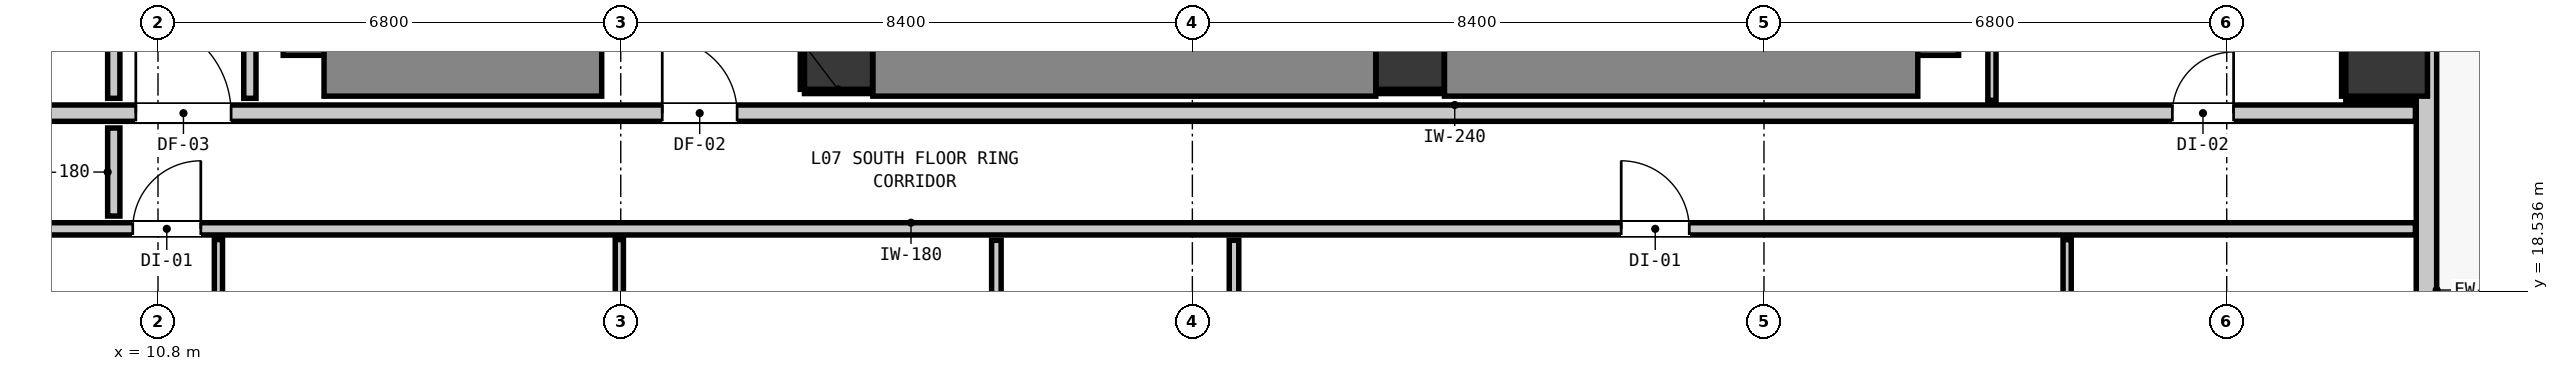
"""IFC4 building model, lengths in metres.
Left out: names, types, materials, properties, quantities, classifications, styles, units other than length and angle.
Written with IfcOpenShell. Run it as: python <this file> out.ifc"""

import sys

from ifc_helpers import new_model, si_unit, direction, frame, frame_2d, origin, origin_2d, place, context, subcontext, project, spatial, rectangle, extrude, element, fill, save


model = new_model("IFC4")
c1 = context("Model", 3, precision=1e-05, world=origin(), true_north=direction((0.0, 1.0)))
c2 = subcontext(c1, "Body", "Model", "MODEL_VIEW")
j1 = project(units=[si_unit("LENGTHUNIT", "METRE"), si_unit("PLANEANGLEUNIT", "RADIAN")], contexts=[c1])
p1 = place(None, origin())
s1 = spatial("IfcSite", under=j1, at=p1, CompositionType="ELEMENT")
p2 = place(p1, origin())
s2 = spatial("IfcBuilding", under=s1, at=p2, CompositionType="ELEMENT")
p3 = place(p2, frame((0.0, 0.0, 28.64)))
s3 = spatial("IfcBuildingStorey", under=s2, at=p3, CompositionType="ELEMENT", Elevation=28.64)
for number, where, z_axis, x_axis in (
    (1, (20.8, 22.0, 0.0), (0.0, 0.0, 1.0), (1.0, 0.0, 0.0)),
    (2, (29.2, 22.0, 0.0), (0.0, 0.0, 1.0), (1.0, 0.0, 0.0)),
):
    element("IfcColumn", number, at=place(p3, frame(where, z_axis=z_axis, x_axis=x_axis)), inside=s3, PredefinedType="COLUMN", context=c2, shape_type="SweptSolid", body=[
        extrude(rectangle(XDim=1.0, YDim=1.0, at=origin_2d()), origin(), (0.0, 0.0, 1.0), 3.32),
    ])
p4 = place(p3, frame((13.24, 22.0, 0.0), z_axis=(0.0, 0.0, 1.0), x_axis=(0.0, 1.0, 0.0)))
e3 = element("IfcWall", 3, at=p4, inside=s3, PredefinedType="SHEAR", context=c2, shape_type="SweptSolid", body=[
    extrude(rectangle(XDim=8.195, YDim=1.2, at=frame_2d((4.098, 0.0))), origin(), (0.0, 0.0, 1.0), 3.32),
])
p5 = place(p3, frame((13.24, 22.0, 0.0), z_axis=(0.0, 0.0, 1.0), x_axis=(1.0, 0.0, 0.0)))
e4 = element("IfcWall", 4, at=p5, inside=s3, PredefinedType="SHEAR", context=c2, shape_type="SweptSolid", body=[
    extrude(rectangle(XDim=4.08, YDim=1.2, at=frame_2d((2.04, 0.0))), origin(), (0.0, 0.0, 1.0), 3.32),
])
p6 = place(p3, frame((36.66, 22.0, 0.0), z_axis=(0.0, 0.0, 1.0), x_axis=(0.0, 1.0, 0.0)))
e5 = element("IfcWall", 5, at=p6, inside=s3, PredefinedType="SHEAR", context=c2, shape_type="SweptSolid", body=[
    extrude(rectangle(XDim=8.195, YDim=1.2, at=frame_2d((4.098, 0.0))), origin(), (0.0, 0.0, 1.0), 3.32),
])
p7 = place(p3, frame((29.705, 22.0, 0.0), z_axis=(0.0, 0.0, 1.0), x_axis=(1.0, 0.0, 0.0)))
e6 = element("IfcWall", 6, at=p7, inside=s3, PredefinedType="SHEAR", context=c2, shape_type="SweptSolid", body=[
    extrude(rectangle(XDim=6.955, YDim=1.2, at=frame_2d((3.478, 0.0))), origin(), (0.0, 0.0, 1.0), 3.32),
])
p8 = place(p3, frame((21.305, 22.0, 0.0), z_axis=(0.0, 0.0, 1.0), x_axis=(1.0, 0.0, 0.0)))
e7 = element("IfcWall", 7, at=p8, inside=s3, PredefinedType="SHEAR", context=c2, shape_type="SweptSolid", body=[
    extrude(rectangle(XDim=7.39, YDim=1.2, at=frame_2d((3.695, 0.0))), origin(), (0.0, 0.0, 1.0), 3.32),
])
p9 = place(p3, frame((43.55, 22.0, 0.0), z_axis=(0.0, 0.0, 1.0), x_axis=(1.0, 0.0, 0.0)))
e8 = element("IfcColumn", 8, at=p9, inside=s3, PredefinedType="COLUMN", context=c2, shape_type="SweptSolid", body=[
    extrude(rectangle(XDim=1.2, YDim=1.2, at=origin_2d()), origin(), (0.0, 0.0, 1.0), 3.32),
])
p10 = place(p3, frame((44.135, 44.835, 0.0), z_axis=(0.0, 0.0, 1.0), x_axis=(0.0, -1.0, 0.0)))
e9 = element("IfcWall", 9, at=p10, inside=s3, PredefinedType="STANDARD", context=c2, shape_type="SweptSolid", body=[
    extrude(rectangle(XDim=34.67, YDim=0.3, at=frame_2d((17.335, 0.0))), origin(), (0.0, 0.0, 1.0), 3.06),
])
p11 = place(p10, frame((1.251, 0.0, 0.0)))
e10 = element("IfcOpeningElement", 10, at=p11, cuts=e9, PredefinedType="OPENING", context=c2, shape_type="SweptSolid", body=[
    extrude(rectangle(XDim=1.0, YDim=2.15, at=frame_2d((0.5, 1.075))), frame((0.0, 0.16, 0.0), z_axis=(0.0, -1.0, 0.0), x_axis=(1.0, 0.0, 0.0)), (0.0, 0.0, 1.0), 0.32),
])
p12 = place(p10, frame((32.733, 0.0, 0.85)))
e11 = element("IfcOpeningElement", 11, at=p12, cuts=e9, PredefinedType="OPENING", context=c2, shape_type="SweptSolid", body=[
    extrude(rectangle(XDim=1.05, YDim=1.65, at=frame_2d((0.525, 0.825))), frame((0.0, 0.16, 0.0), z_axis=(0.0, -1.0, 0.0), x_axis=(1.0, 0.0, 0.0)), (0.0, 0.0, 1.0), 0.32),
])
p13 = place(p10, frame((17.135, 0.0, 0.85)))
e12 = element("IfcOpeningElement", 12, at=p13, cuts=e9, PredefinedType="OPENING", context=c2, shape_type="SweptSolid", body=[
    extrude(rectangle(XDim=2.7, YDim=2.0, at=frame_2d((1.35, 1.0))), frame((0.0, 0.16, 0.0), z_axis=(0.0, -1.0, 0.0), x_axis=(1.0, 0.0, 0.0)), (0.0, 0.0, 1.0), 0.32),
])
p14 = place(p10, frame((6.984, 0.0, 0.85)))
e13 = element("IfcOpeningElement", 13, at=p14, cuts=e9, PredefinedType="OPENING", context=c2, shape_type="SweptSolid", body=[
    extrude(rectangle(XDim=1.05, YDim=1.65, at=frame_2d((0.525, 0.825))), frame((0.0, 0.16, 0.0), z_axis=(0.0, -1.0, 0.0), x_axis=(1.0, 0.0, 0.0)), (0.0, 0.0, 1.0), 0.32),
])
p15 = place(p3, frame((1.827, 21.15, 0.0), z_axis=(0.0, 0.0, 1.0), x_axis=(1.0, 0.0, 0.0)))
e14 = element("IfcWall", 14, at=p15, inside=s3, PredefinedType="PARTITIONING", context=c2, shape_type="SweptSolid", body=[
    extrude(rectangle(XDim=42.146, YDim=0.24, at=frame_2d((21.073, 0.0))), origin(), (0.0, 0.0, 1.0), 3.06),
])
p16 = place(p15, frame((16.383, 0.0, 0.0)))
e15 = element("IfcOpeningElement", 15, at=p16, cuts=e14, PredefinedType="OPENING", context=c2, shape_type="SweptSolid", body=[
    extrude(rectangle(XDim=1.1, YDim=2.15, at=frame_2d((0.55, 1.075))), frame((0.0, 0.13, 0.0), z_axis=(0.0, -1.0, 0.0), x_axis=(1.0, 0.0, 0.0)), (0.0, 0.0, 1.0), 0.26),
])
p17 = place(p15, frame((8.647, 0.0, 0.0)))
e16 = element("IfcOpeningElement", 16, at=p17, cuts=e14, PredefinedType="OPENING", context=c2, shape_type="SweptSolid", body=[
    extrude(rectangle(XDim=1.4, YDim=2.15, at=frame_2d((0.7, 1.075))), frame((0.0, 0.13, 0.0), z_axis=(0.0, -1.0, 0.0), x_axis=(1.0, 0.0, 0.0)), (0.0, 0.0, 1.0), 0.26),
])
p18 = place(p15, frame((38.574, 0.0, 0.0)))
e17 = element("IfcOpeningElement", 17, at=p18, cuts=e14, PredefinedType="OPENING", context=c2, shape_type="SweptSolid", body=[
    extrude(rectangle(XDim=0.9, YDim=2.1, at=frame_2d((0.45, 1.05))), frame((0.0, 0.13, 0.0), z_axis=(0.0, -1.0, 0.0), x_axis=(1.0, 0.0, 0.0)), (0.0, 0.0, 1.0), 0.26),
])
p19 = place(p3, frame((1.827, 19.45, 0.0), z_axis=(0.0, 0.0, 1.0), x_axis=(1.0, 0.0, 0.0)))
e18 = element("IfcWall", 18, at=p19, inside=s3, PredefinedType="PARTITIONING", context=c2, shape_type="SweptSolid", body=[
    extrude(rectangle(XDim=42.146, YDim=0.18, at=frame_2d((21.073, 0.0))), origin(), (0.0, 0.0, 1.0), 3.06),
])
p20 = place(p19, frame((8.602, 0.0, 0.0)))
e19 = element("IfcOpeningElement", 19, at=p20, cuts=e18, PredefinedType="OPENING", context=c2, shape_type="SweptSolid", body=[
    extrude(rectangle(XDim=1.0, YDim=2.15, at=frame_2d((0.5, 1.075))), frame((0.0, 0.1, 0.0), z_axis=(0.0, -1.0, 0.0), x_axis=(1.0, 0.0, 0.0)), (0.0, 0.0, 1.0), 0.2),
])
p21 = place(p19, frame((30.475, 0.0, 0.0)))
e20 = element("IfcOpeningElement", 20, at=p21, cuts=e18, PredefinedType="OPENING", context=c2, shape_type="SweptSolid", body=[
    extrude(rectangle(XDim=1.0, YDim=2.15, at=frame_2d((0.5, 1.075))), frame((0.0, 0.1, 0.0), z_axis=(0.0, -1.0, 0.0), x_axis=(1.0, 0.0, 0.0)), (0.0, 0.0, 1.0), 0.2),
])
p22 = place(p3, frame((10.15, 19.638, 0.0), z_axis=(0.0, 0.0, 1.0), x_axis=(0.0, 1.0, 0.0)))
e21 = element("IfcWall", 21, at=p22, inside=s3, PredefinedType="PARTITIONING", context=c2, shape_type="SweptSolid", body=[
    extrude(rectangle(XDim=1.294, YDim=0.18, at=frame_2d((0.647, 0.0))), origin(), (0.0, 0.0, 1.0), 3.06),
])
p23 = place(p3, frame((10.15, 21.368, 0.0), z_axis=(0.0, 0.0, 1.0), x_axis=(0.0, 1.0, 0.0)))
e22 = element("IfcWall", 22, at=p23, inside=s3, PredefinedType="PARTITIONING", context=c2, shape_type="SweptSolid", body=[
    extrude(rectangle(XDim=5.354, YDim=0.18, at=frame_2d((2.677, 0.0))), origin(), (0.0, 0.0, 1.0), 3.06),
])
p24 = place(p3, frame((12.15, 21.368, 0.0), z_axis=(0.0, 0.0, 1.0), x_axis=(0.0, 1.0, 0.0)))
e23 = element("IfcWall", 23, at=p24, inside=s3, PredefinedType="PARTITIONING", context=c2, shape_type="SweptSolid", body=[
    extrude(rectangle(XDim=18.694, YDim=0.18, at=frame_2d((9.347, 0.0))), origin(), (0.0, 0.0, 1.0), 3.06),
])
p25 = place(p3, frame((23.12, 13.148, 0.0), z_axis=(0.0, 0.0, 1.0), x_axis=(0.0, 1.0, 0.0)))
e24 = element("IfcWall", 24, at=p25, inside=s3, PredefinedType="PARTITIONING", context=c2, shape_type="SweptSolid", body=[
    extrude(rectangle(XDim=6.134, YDim=0.14, at=frame_2d((3.067, 0.0))), origin(), (0.0, 0.0, 1.0), 3.06),
])
p26 = place(p3, frame((26.612, 13.148, 0.0), z_axis=(0.0, 0.0, 1.0), x_axis=(0.0, 1.0, 0.0)))
e25 = element("IfcWall", 25, at=p26, inside=s3, PredefinedType="PARTITIONING", context=c2, shape_type="SweptSolid", body=[
    extrude(rectangle(XDim=6.134, YDim=0.14, at=frame_2d((3.067, 0.0))), origin(), (0.0, 0.0, 1.0), 3.06),
])
p27 = place(p26, frame((2.647, 0.0, 0.0)))
e26 = element("IfcOpeningElement", 26, at=p27, cuts=e25, PredefinedType="OPENING", context=c2, shape_type="SweptSolid", body=[
    extrude(rectangle(XDim=0.86, YDim=2.02, at=frame_2d((0.43, 1.01))), frame((0.0, 0.08, 0.0), z_axis=(0.0, -1.0, 0.0), x_axis=(1.0, 0.0, 0.0)), (0.0, 0.0, 1.0), 0.16),
])
p28 = place(p3, frame((11.688, 13.138, 0.0), z_axis=(0.0, 0.0, 1.0), x_axis=(0.0, 1.0, 0.0)))
e27 = element("IfcWall", 27, at=p28, inside=s3, PredefinedType="PARTITIONING", context=c2, shape_type="SweptSolid", body=[
    extrude(rectangle(XDim=6.154, YDim=0.12, at=frame_2d((3.077, 0.0))), origin(), (0.0, 0.0, 1.0), 3.06),
])
p29 = place(p28, frame((2.624, 0.0, 0.0)))
e28 = element("IfcOpeningElement", 28, at=p29, cuts=e27, PredefinedType="OPENING", context=c2, shape_type="SweptSolid", body=[
    extrude(rectangle(XDim=0.9, YDim=2.1, at=frame_2d((0.45, 1.05))), frame((0.0, 0.07, 0.0), z_axis=(0.0, -1.0, 0.0), x_axis=(1.0, 0.0, 0.0)), (0.0, 0.0, 1.0), 0.14),
])
p30 = place(p3, frame((17.579, 13.138, 0.0), z_axis=(0.0, 0.0, 1.0), x_axis=(0.0, 1.0, 0.0)))
e29 = element("IfcWall", 29, at=p30, inside=s3, PredefinedType="PARTITIONING", context=c2, shape_type="SweptSolid", body=[
    extrude(rectangle(XDim=6.154, YDim=0.12, at=frame_2d((3.077, 0.0))), origin(), (0.0, 0.0, 1.0), 3.06),
])
p31 = place(p30, frame((2.637, 0.0, 0.0)))
e30 = element("IfcOpeningElement", 30, at=p31, cuts=e29, PredefinedType="OPENING", context=c2, shape_type="SweptSolid", body=[
    extrude(rectangle(XDim=0.9, YDim=2.1, at=frame_2d((0.45, 1.05))), frame((0.0, 0.07, 0.0), z_axis=(0.0, -1.0, 0.0), x_axis=(1.0, 0.0, 0.0)), (0.0, 0.0, 1.0), 0.14),
])
p32 = place(p3, frame((37.75, 21.338, 0.0), z_axis=(0.0, 0.0, 1.0), x_axis=(0.0, 1.0, 0.0)))
e31 = element("IfcWall", 31, at=p32, inside=s3, PredefinedType="PARTITIONING", context=c2, shape_type="SweptSolid", body=[
    extrude(rectangle(XDim=10.124, YDim=0.12, at=frame_2d((5.062, 0.0))), origin(), (0.0, 0.0, 1.0), 3.06),
])
p33 = place(p3, frame((38.855, 13.138, 0.0), z_axis=(0.0, 0.0, 1.0), x_axis=(0.0, 1.0, 0.0)))
e32 = element("IfcWall", 32, at=p33, inside=s3, PredefinedType="PARTITIONING", context=c2, shape_type="SweptSolid", body=[
    extrude(rectangle(XDim=6.154, YDim=0.12, at=frame_2d((3.077, 0.0))), origin(), (0.0, 0.0, 1.0), 2.445),
])
p34 = place(p33, frame((2.637, 0.0, 0.0)))
e33 = element("IfcOpeningElement", 33, at=p34, cuts=e32, PredefinedType="OPENING", context=c2, shape_type="SweptSolid", body=[
    extrude(rectangle(XDim=0.9, YDim=2.1, at=frame_2d((0.45, 1.05))), frame((0.0, 0.07, 0.0), z_axis=(0.0, -1.0, 0.0), x_axis=(1.0, 0.0, 0.0)), (0.0, 0.0, 1.0), 0.14),
])
p35 = place(p3, frame((20.3, 21.468, 0.0), z_axis=(0.0, 0.0, 1.0), x_axis=(1.0, 0.0, 0.0)))
e34 = element("IfcWall", 34, at=p35, inside=s3, PredefinedType="PARTITIONING", context=c2, shape_type="SweptSolid", body=[
    extrude(rectangle(XDim=0.99, YDim=0.06, at=frame_2d((0.495, 0.0))), origin(), (0.0, 0.0, 1.0), 1.45),
])
p36 = place(p3, frame((20.268, 21.5, 0.0), z_axis=(0.0, 0.0, 1.0), x_axis=(0.0, 1.0, 0.0)))
e35 = element("IfcWall", 35, at=p36, inside=s3, PredefinedType="PARTITIONING", context=c2, shape_type="SweptSolid", body=[
    extrude(rectangle(XDim=1.0, YDim=0.06, at=frame_2d((0.5, 0.0))), origin(), (0.0, 0.0, 1.0), 1.45),
])
p37 = place(p3, frame((28.71, 21.468, 0.0), z_axis=(0.0, 0.0, 1.0), x_axis=(1.0, 0.0, 0.0)))
e36 = element("IfcWall", 36, at=p37, inside=s3, PredefinedType="PARTITIONING", context=c2, shape_type="SweptSolid", body=[
    extrude(rectangle(XDim=0.98, YDim=0.06, at=frame_2d((0.49, 0.0))), origin(), (0.0, 0.0, 1.0), 1.45),
])
p38 = place(p3, frame((42.95, 21.368, 0.0), z_axis=(0.0, 0.0, 1.0), x_axis=(1.0, 0.0, 0.0)))
e37 = element("IfcWall", 37, at=p38, inside=s3, PredefinedType="PARTITIONING", context=c2, shape_type="SweptSolid", body=[
    extrude(rectangle(XDim=1.02, YDim=0.06, at=frame_2d((0.51, 0.0))), origin(), (0.0, 0.0, 1.0), 1.45),
])
p39 = place(p3, frame((42.918, 21.4, 0.0), z_axis=(0.0, 0.0, 1.0), x_axis=(0.0, 1.0, 0.0)))
e38 = element("IfcWall", 38, at=p39, inside=s3, PredefinedType="PARTITIONING", context=c2, shape_type="SweptSolid", body=[
    extrude(rectangle(XDim=1.2, YDim=0.06, at=frame_2d((0.6, 0.0))), origin(), (0.0, 0.0, 1.0), 1.45),
])
p40 = place(p16, origin())
e39 = element("IfcDoor", 39, at=p40, inside=s3, OperationType="SINGLE_SWING_LEFT", PredefinedType="DOOR", context=c2, shape_type="SweptSolid", body=[
    extrude(rectangle(XDim=1.1, YDim=2.15, at=frame_2d((0.55, 1.075))), frame((0.0, 0.025, 0.0), z_axis=(0.0, -1.0, 0.0), x_axis=(1.0, 0.0, 0.0)), (0.0, 0.0, 1.0), 0.05),
])
fill(e15, e39)
p41 = place(p17, origin())
e40 = element("IfcDoor", 40, at=p41, inside=s3, OperationType="SINGLE_SWING_LEFT", PredefinedType="DOOR", context=c2, shape_type="SweptSolid", body=[
    extrude(rectangle(XDim=1.4, YDim=2.15, at=frame_2d((0.7, 1.075))), frame((0.0, 0.025, 0.0), z_axis=(0.0, -1.0, 0.0), x_axis=(1.0, 0.0, 0.0)), (0.0, 0.0, 1.0), 0.05),
])
fill(e16, e40)
p42 = place(p20, origin())
e41 = element("IfcDoor", 41, at=p42, inside=s3, OperationType="SINGLE_SWING_RIGHT", PredefinedType="DOOR", context=c2, shape_type="SweptSolid", body=[
    extrude(rectangle(XDim=1.0, YDim=2.15, at=frame_2d((0.5, 1.075))), frame((0.0, 0.025, 0.0), z_axis=(0.0, -1.0, 0.0), x_axis=(1.0, 0.0, 0.0)), (0.0, 0.0, 1.0), 0.05),
])
fill(e19, e41)
p43 = place(p21, origin())
e42 = element("IfcDoor", 42, at=p43, inside=s3, OperationType="SINGLE_SWING_LEFT", PredefinedType="DOOR", context=c2, shape_type="SweptSolid", body=[
    extrude(rectangle(XDim=1.0, YDim=2.15, at=frame_2d((0.5, 1.075))), frame((0.0, 0.025, 0.0), z_axis=(0.0, -1.0, 0.0), x_axis=(1.0, 0.0, 0.0)), (0.0, 0.0, 1.0), 0.05),
])
fill(e20, e42)
p44 = place(p18, origin())
e43 = element("IfcDoor", 43, at=p44, inside=s3, OperationType="SINGLE_SWING_RIGHT", PredefinedType="DOOR", context=c2, shape_type="SweptSolid", body=[
    extrude(rectangle(XDim=0.9, YDim=2.1, at=frame_2d((0.45, 1.05))), frame((0.0, 0.025, 0.0), z_axis=(0.0, -1.0, 0.0), x_axis=(1.0, 0.0, 0.0)), (0.0, 0.0, 1.0), 0.05),
])
fill(e17, e43)
save(model, sys.argv[1])
